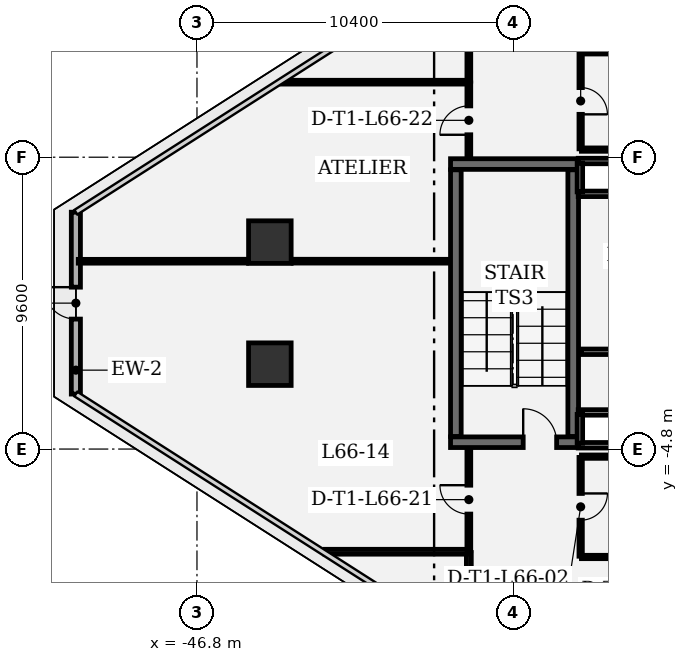
"""IFC4 building model, lengths in metres.
Left out: names, types, materials, properties, quantities, classifications, styles, units other than length and angle.
Written with IfcOpenShell. Run it as: python <this file> out.ifc"""

import sys

from ifc_helpers import new_model, si_unit, direction, frame, frame_2d, origin, origin_2d, place, context, subcontext, project, spatial, rectangle, extrude, element, fill, save


model = new_model("IFC4")
c1 = context("Model", 3, precision=1e-05, world=origin(), true_north=direction((0.0, 1.0)))
c2 = subcontext(c1, "Body", "Model", "MODEL_VIEW")
j1 = project(units=[si_unit("LENGTHUNIT", "METRE"), si_unit("PLANEANGLEUNIT", "RADIAN")], contexts=[c1])
p1 = place(None, origin())
s1 = spatial("IfcSite", under=j1, at=p1, CompositionType="ELEMENT")
p2 = place(p1, origin())
s2 = spatial("IfcBuilding", under=s1, at=p2, CompositionType="ELEMENT")
p3 = place(p2, frame((0.0, 0.0, 285.0)))
s3 = spatial("IfcBuildingStorey", under=s2, at=p3, CompositionType="ELEMENT", Elevation=285.0)
for number, where, z_axis, x_axis in (
    (1, (-44.403, 2.008, 0.0), (0.0, 0.0, 1.0), (1.0, 0.0, 0.0)),
    (2, (-44.403, -2.008, 0.0), (0.0, 0.0, 1.0), (1.0, 0.0, 0.0)),
):
    element("IfcColumn", number, at=place(p3, frame(where, z_axis=z_axis, x_axis=x_axis)), inside=s3, PredefinedType="COLUMN", context=c2, shape_type="SweptSolid", body=[
        extrude(rectangle(XDim=1.4, YDim=1.4, at=origin_2d()), origin(), (0.0, 0.0, 1.0), 4.2),
    ])
p4 = place(p3, frame((-50.783, -2.991, 0.0), z_axis=(0.0, 0.0, 1.0), x_axis=(0.0, 1.0, 0.0)))
e3 = element("IfcWall", 3, at=p4, inside=s3, PredefinedType="SOLIDWALL", context=c2, shape_type="SweptSolid", body=[
    extrude(rectangle(XDim=5.982, YDim=0.3, at=frame_2d((2.991, 0.0))), origin(), (0.0, 0.0, 1.0), 3.91),
])
p5 = place(p4, frame((2.466, 0.0, 0.0)))
e4 = element("IfcOpeningElement", 4, at=p5, cuts=e3, PredefinedType="OPENING", context=c2, shape_type="SweptSolid", body=[
    extrude(rectangle(XDim=1.05, YDim=2.2, at=frame_2d((0.525, 1.1))), frame((0.0, 0.16, 0.0), z_axis=(0.0, -1.0, 0.0), x_axis=(1.0, 0.0, 0.0)), (0.0, 0.0, 1.0), 0.32),
])
p6 = place(p3, frame((-38.46, -4.575, 0.0), z_axis=(0.0, 0.0, 1.0), x_axis=(1.0, 0.0, 0.0)))
e5 = element("IfcWall", 5, at=p6, inside=s3, PredefinedType="SHEAR", context=c2, shape_type="SweptSolid", body=[
    extrude(rectangle(XDim=4.21, YDim=0.35, at=frame_2d((2.105, 0.0))), origin(), (0.0, 0.0, 1.0), 3.91),
])
p7 = place(p6, frame((2.39, 0.0, 0.0)))
e6 = element("IfcOpeningElement", 6, at=p7, cuts=e5, PredefinedType="OPENING", context=c2, shape_type="SweptSolid", body=[
    extrude(rectangle(XDim=1.1, YDim=2.2, at=frame_2d((0.55, 1.1))), frame((0.0, 0.185, 0.0), z_axis=(0.0, -1.0, 0.0), x_axis=(1.0, 0.0, 0.0)), (0.0, 0.0, 1.0), 0.37),
])
p8 = place(p3, frame((-34.25, 4.575, 0.0), z_axis=(0.0, 0.0, 1.0), x_axis=(-1.0, 0.0, 0.0)))
e7 = element("IfcWall", 7, at=p8, inside=s3, PredefinedType="SHEAR", context=c2, shape_type="SweptSolid", body=[
    extrude(rectangle(XDim=4.21, YDim=0.35, at=frame_2d((2.105, 0.0))), origin(), (0.0, 0.0, 1.0), 3.91),
])
for number, where, z_axis, x_axis in (
    (8, (-34.425, -4.385, 0.0), (0.0, 0.0, 1.0), (0.0, 1.0, 0.0)),
    (9, (-38.285, 4.385, 0.0), (0.0, 0.0, 1.0), (0.0, -1.0, 0.0)),
):
    element("IfcWall", number, at=place(p3, frame(where, z_axis=z_axis, x_axis=x_axis)), inside=s3, PredefinedType="SHEAR", context=c2, shape_type="SweptSolid", body=[
        extrude(rectangle(XDim=8.77, YDim=0.35, at=frame_2d((4.385, 0.0))), origin(), (0.0, 0.0, 1.0), 3.91),
    ])
for number, where, z_axis, x_axis in (
    (10, (-32.99, 3.595, 0.0), (0.0, 0.0, 1.0), (-1.0, 0.0, 0.0)),
    (11, (-34.26, 4.675, 0.0), (0.0, 0.0, 1.0), (1.0, 0.0, 0.0)),
):
    element("IfcWall", number, at=place(p3, frame(where, z_axis=z_axis, x_axis=x_axis)), inside=s3, PredefinedType="PARTITIONING", context=c2, shape_type="SweptSolid", body=[
        extrude(rectangle(XDim=1.27, YDim=0.18, at=frame_2d((0.635, 0.0))), origin(), (0.0, 0.0, 1.0), 3.91),
    ])
p9 = place(p3, frame((-34.205, 3.66, 0.0), z_axis=(0.0, 0.0, 1.0), x_axis=(0.0, 1.0, 0.0)))
e12 = element("IfcWall", 12, at=p9, inside=s3, PredefinedType="PARTITIONING", context=c2, shape_type="SweptSolid", body=[
    extrude(rectangle(XDim=0.95, YDim=0.18, at=frame_2d((0.475, 0.0))), origin(), (0.0, 0.0, 1.0), 3.91),
])
for number, where, z_axis, x_axis in (
    (13, (-32.99, -4.675, 0.0), (0.0, 0.0, 1.0), (-1.0, 0.0, 0.0)),
    (14, (-34.26, -3.595, 0.0), (0.0, 0.0, 1.0), (1.0, 0.0, 0.0)),
):
    element("IfcWall", number, at=place(p3, frame(where, z_axis=z_axis, x_axis=x_axis)), inside=s3, PredefinedType="PARTITIONING", context=c2, shape_type="SweptSolid", body=[
        extrude(rectangle(XDim=1.27, YDim=0.18, at=frame_2d((0.635, 0.0))), origin(), (0.0, 0.0, 1.0), 3.91),
    ])
p10 = place(p3, frame((-34.205, -4.61, 0.0), z_axis=(0.0, 0.0, 1.0), x_axis=(0.0, 1.0, 0.0)))
e15 = element("IfcWall", 15, at=p10, inside=s3, PredefinedType="PARTITIONING", context=c2, shape_type="SweptSolid", body=[
    extrude(rectangle(XDim=0.95, YDim=0.18, at=frame_2d((0.475, 0.0))), origin(), (0.0, 0.0, 1.0), 3.91),
])
p11 = place(p3, frame((-34.18, 8.225, 0.0), z_axis=(0.0, 0.0, 1.0), x_axis=(0.0, -1.0, 0.0)))
e16 = element("IfcWall", 16, at=p11, inside=s3, PredefinedType="PARTITIONING", context=c2, shape_type="SweptSolid", body=[
    extrude(rectangle(XDim=3.15, YDim=0.11, at=frame_2d((1.575, 0.0))), origin(), (0.0, 0.0, 1.0), 3.91),
])
p12 = place(p11, frame((1.135, 0.0, 0.0)))
e17 = element("IfcOpeningElement", 17, at=p12, cuts=e16, PredefinedType="OPENING", context=c2, shape_type="SweptSolid", body=[
    extrude(rectangle(XDim=0.88, YDim=2.1, at=frame_2d((0.44, 1.05))), frame((0.0, 0.065, 0.0), z_axis=(0.0, -1.0, 0.0), x_axis=(1.0, 0.0, 0.0)), (0.0, 0.0, 1.0), 0.13),
])
p13 = place(p3, frame((-34.155, 5.05, 0.0), z_axis=(0.0, 0.0, 1.0), x_axis=(1.0, 0.0, 0.0)))
e18 = element("IfcWall", 18, at=p13, inside=s3, PredefinedType="PARTITIONING", context=c2, shape_type="SweptSolid", body=[
    extrude(rectangle(XDim=3.19, YDim=0.11, at=frame_2d((1.595, 0.0))), origin(), (0.0, 0.0, 1.0), 3.91),
])
for number, where, z_axis, x_axis in (
    (19, (-30.905, 8.25, 0.0), (0.0, 0.0, 1.0), (-1.0, 0.0, 0.0)),
    (20, (-34.155, -8.35, 0.0), (0.0, 0.0, 1.0), (1.0, 0.0, 0.0)),
):
    element("IfcWall", number, at=place(p3, frame(where, z_axis=z_axis, x_axis=x_axis)), inside=s3, PredefinedType="PARTITIONING", context=c2, shape_type="SweptSolid", body=[
        extrude(rectangle(XDim=3.25, YDim=0.11, at=frame_2d((1.625, 0.0))), origin(), (0.0, 0.0, 1.0), 3.13),
    ])
p14 = place(p3, frame((-30.965, -5.05, 0.0), z_axis=(0.0, 0.0, 1.0), x_axis=(-1.0, 0.0, 0.0)))
e21 = element("IfcWall", 21, at=p14, inside=s3, PredefinedType="PARTITIONING", context=c2, shape_type="SweptSolid", body=[
    extrude(rectangle(XDim=3.19, YDim=0.11, at=frame_2d((1.595, 0.0))), origin(), (0.0, 0.0, 1.0), 3.91),
])
p15 = place(p3, frame((-34.18, -5.075, 0.0), z_axis=(0.0, 0.0, 1.0), x_axis=(0.0, -1.0, 0.0)))
e22 = element("IfcWall", 22, at=p15, inside=s3, PredefinedType="PARTITIONING", context=c2, shape_type="SweptSolid", body=[
    extrude(rectangle(XDim=3.25, YDim=0.11, at=frame_2d((1.625, 0.0))), origin(), (0.0, 0.0, 1.0), 3.91),
])
p16 = place(p15, frame((1.185, 0.0, 0.0)))
e23 = element("IfcOpeningElement", 23, at=p16, cuts=e22, PredefinedType="OPENING", context=c2, shape_type="SweptSolid", body=[
    extrude(rectangle(XDim=0.88, YDim=2.1, at=frame_2d((0.44, 1.05))), frame((0.0, 0.065, 0.0), z_axis=(0.0, -1.0, 0.0), x_axis=(1.0, 0.0, 0.0)), (0.0, 0.0, 1.0), 0.13),
])
p17 = place(p3, frame((-30.905, -1.6, 0.0), z_axis=(0.0, 0.0, 1.0), x_axis=(-1.0, 0.0, 0.0)))
e24 = element("IfcWall", 24, at=p17, inside=s3, PredefinedType="PARTITIONING", context=c2, shape_type="SweptSolid", body=[
    extrude(rectangle(XDim=3.25, YDim=0.18, at=frame_2d((1.625, 0.0))), origin(), (0.0, 0.0, 1.0), 3.91),
])
p18 = place(p17, frame((1.185, 0.0, 0.0)))
e25 = element("IfcOpeningElement", 25, at=p18, cuts=e24, PredefinedType="OPENING", context=c2, shape_type="SweptSolid", body=[
    extrude(rectangle(XDim=0.88, YDim=2.1, at=frame_2d((0.44, 1.05))), frame((0.0, 0.1, 0.0), z_axis=(0.0, -1.0, 0.0), x_axis=(1.0, 0.0, 0.0)), (0.0, 0.0, 1.0), 0.2),
])
p19 = place(p3, frame((-37.858, -11.172, 0.0), z_axis=(0.0, 0.0, 1.0), x_axis=(0.0, 1.0, 0.0)))
e26 = element("IfcWall", 26, at=p19, inside=s3, PredefinedType="PARTITIONING", context=c2, shape_type="SweptSolid", body=[
    extrude(rectangle(XDim=2.97, YDim=0.16, at=frame_2d((1.485, 0.0))), origin(), (0.0, 0.0, 1.0), 3.91),
])
p20 = place(p3, frame((-37.883, -8.177, 0.0), z_axis=(0.0, 0.0, 1.0), x_axis=(-1.0, 0.0, 0.0)))
e27 = element("IfcWall", 27, at=p20, inside=s3, PredefinedType="PARTITIONING", context=c2, shape_type="SweptSolid", body=[
    extrude(rectangle(XDim=4.706, YDim=0.16, at=frame_2d((2.353, 0.0))), origin(), (0.0, 0.0, 1.0), 3.91),
])
p21 = place(p3, frame((-37.858, -8.144, 0.0), z_axis=(0.0, 0.0, 1.0), x_axis=(0.0, 1.0, 0.0)))
e28 = element("IfcWall", 28, at=p21, inside=s3, PredefinedType="PARTITIONING", context=c2, shape_type="SweptSolid", body=[
    extrude(rectangle(XDim=3.361, YDim=0.125, at=frame_2d((1.681, 0.0))), origin(), (0.0, 0.0, 1.0), 3.91),
])
p22 = place(p21, frame((1.206, 0.0, 0.0)))
e29 = element("IfcOpeningElement", 29, at=p22, cuts=e28, PredefinedType="OPENING", context=c2, shape_type="SweptSolid", body=[
    extrude(rectangle(XDim=0.95, YDim=2.15, at=frame_2d((0.475, 1.075))), frame((0.0, 0.073, 0.0), z_axis=(0.0, -1.0, 0.0), x_axis=(1.0, 0.0, 0.0)), (0.0, 0.0, 1.0), 0.145),
])
p23 = place(p3, frame((-38.493, 1.379, 0.0), z_axis=(0.0, 0.0, 1.0), x_axis=(-0.999999944823, 0.000332194363, 0.0)))
e30 = element("IfcWall", 30, at=p23, inside=s3, PredefinedType="PARTITIONING", context=c2, shape_type="SweptSolid", body=[
    extrude(rectangle(XDim=5.145, YDim=0.125, at=frame_2d((2.572, 0.0))), origin(), (0.0, 0.0, 1.0), 3.91),
])
p24 = place(p3, frame((-45.167, 1.38, 0.0), z_axis=(0.0, 0.0, 1.0), x_axis=(-0.999999809396, -0.000617419948, 0.0)))
e31 = element("IfcWall", 31, at=p24, inside=s3, PredefinedType="PARTITIONING", context=c2, shape_type="SweptSolid", body=[
    extrude(rectangle(XDim=5.536, YDim=0.125, at=frame_2d((2.768, 0.0))), origin(), (0.0, 0.0, 1.0), 3.91),
])
p25 = place(p3, frame((-37.858, 4.783, 0.0), z_axis=(0.0, 0.0, 1.0), x_axis=(0.0, 1.0, 0.0)))
e32 = element("IfcWall", 32, at=p25, inside=s3, PredefinedType="PARTITIONING", context=c2, shape_type="SweptSolid", body=[
    extrude(rectangle(XDim=2.46, YDim=0.125, at=frame_2d((1.23, 0.0))), origin(), (0.0, 0.0, 1.0), 3.91),
])
p26 = place(p25, frame((0.755, 0.0, 0.0)))
e33 = element("IfcOpeningElement", 33, at=p26, cuts=e32, PredefinedType="OPENING", context=c2, shape_type="SweptSolid", body=[
    extrude(rectangle(XDim=0.95, YDim=2.15, at=frame_2d((0.475, 1.075))), frame((0.0, 0.073, 0.0), z_axis=(0.0, -1.0, 0.0), x_axis=(1.0, 0.0, 0.0)), (0.0, 0.0, 1.0), 0.145),
])
p27 = place(p3, frame((-37.883, 7.268, 0.0), z_axis=(0.0, 0.0, 1.0), x_axis=(-1.0, 0.0, 0.0)))
e34 = element("IfcWall", 34, at=p27, inside=s3, PredefinedType="PARTITIONING", context=c2, shape_type="SweptSolid", body=[
    extrude(rectangle(XDim=6.129, YDim=0.125, at=frame_2d((3.064, 0.0))), origin(), (0.0, 0.0, 1.0), 3.91),
])
p28 = place(p3, frame((-37.858, 7.301, 0.0), z_axis=(0.0, 0.0, 1.0), x_axis=(0.0, 1.0, 0.0)))
e35 = element("IfcWall", 35, at=p28, inside=s3, PredefinedType="PARTITIONING", context=c2, shape_type="SweptSolid", body=[
    extrude(rectangle(XDim=3.872, YDim=0.125, at=frame_2d((1.936, 0.0))), origin(), (0.0, 0.0, 1.0), 3.91),
])
p29 = place(p28, frame((1.461, 0.0, 0.0)))
e36 = element("IfcOpeningElement", 36, at=p29, cuts=e35, PredefinedType="OPENING", context=c2, shape_type="SweptSolid", body=[
    extrude(rectangle(XDim=0.95, YDim=2.15, at=frame_2d((0.475, 1.075))), frame((0.0, 0.073, 0.0), z_axis=(0.0, -1.0, 0.0), x_axis=(1.0, 0.0, 0.0)), (0.0, 0.0, 1.0), 0.145),
])
p30 = place(p5, origin())
e37 = element("IfcDoor", 37, at=p30, inside=s3, OperationType="SINGLE_SWING_RIGHT", PredefinedType="DOOR", context=c2, shape_type="SweptSolid", body=[
    extrude(rectangle(XDim=1.05, YDim=2.2, at=frame_2d((0.525, 1.1))), frame((0.0, 0.025, 0.0), z_axis=(0.0, -1.0, 0.0), x_axis=(1.0, 0.0, 0.0)), (0.0, 0.0, 1.0), 0.05),
])
fill(e4, e37)
p31 = place(p7, origin())
e38 = element("IfcDoor", 38, at=p31, inside=s3, OperationType="SINGLE_SWING_LEFT", PredefinedType="DOOR", context=c2, shape_type="SweptSolid", body=[
    extrude(rectangle(XDim=1.1, YDim=2.2, at=frame_2d((0.55, 1.1))), frame((0.0, 0.025, 0.0), z_axis=(0.0, -1.0, 0.0), x_axis=(1.0, 0.0, 0.0)), (0.0, 0.0, 1.0), 0.05),
])
fill(e6, e38)
p32 = place(p12, origin())
e39 = element("IfcDoor", 39, at=p32, inside=s3, OperationType="SINGLE_SWING_RIGHT", PredefinedType="DOOR", context=c2, shape_type="SweptSolid", body=[
    extrude(rectangle(XDim=0.88, YDim=2.1, at=frame_2d((0.44, 1.05))), frame((0.0, 0.025, 0.0), z_axis=(0.0, -1.0, 0.0), x_axis=(1.0, 0.0, 0.0)), (0.0, 0.0, 1.0), 0.05),
])
fill(e17, e39)
p33 = place(p16, origin())
e40 = element("IfcDoor", 40, at=p33, inside=s3, OperationType="SINGLE_SWING_LEFT", PredefinedType="DOOR", context=c2, shape_type="SweptSolid", body=[
    extrude(rectangle(XDim=0.88, YDim=2.1, at=frame_2d((0.44, 1.05))), frame((0.0, 0.025, 0.0), z_axis=(0.0, -1.0, 0.0), x_axis=(1.0, 0.0, 0.0)), (0.0, 0.0, 1.0), 0.05),
])
fill(e23, e40)
p34 = place(p22, origin())
e41 = element("IfcDoor", 41, at=p34, inside=s3, OperationType="SINGLE_SWING_RIGHT", PredefinedType="DOOR", context=c2, shape_type="SweptSolid", body=[
    extrude(rectangle(XDim=0.95, YDim=2.15, at=frame_2d((0.475, 1.075))), frame((0.0, 0.025, 0.0), z_axis=(0.0, -1.0, 0.0), x_axis=(1.0, 0.0, 0.0)), (0.0, 0.0, 1.0), 0.05),
])
fill(e29, e41)
p35 = place(p26, origin())
e42 = element("IfcDoor", 42, at=p35, inside=s3, OperationType="SINGLE_SWING_LEFT", PredefinedType="DOOR", context=c2, shape_type="SweptSolid", body=[
    extrude(rectangle(XDim=0.95, YDim=2.15, at=frame_2d((0.475, 1.075))), frame((0.0, 0.025, 0.0), z_axis=(0.0, -1.0, 0.0), x_axis=(1.0, 0.0, 0.0)), (0.0, 0.0, 1.0), 0.05),
])
fill(e33, e42)
save(model, sys.argv[1])
